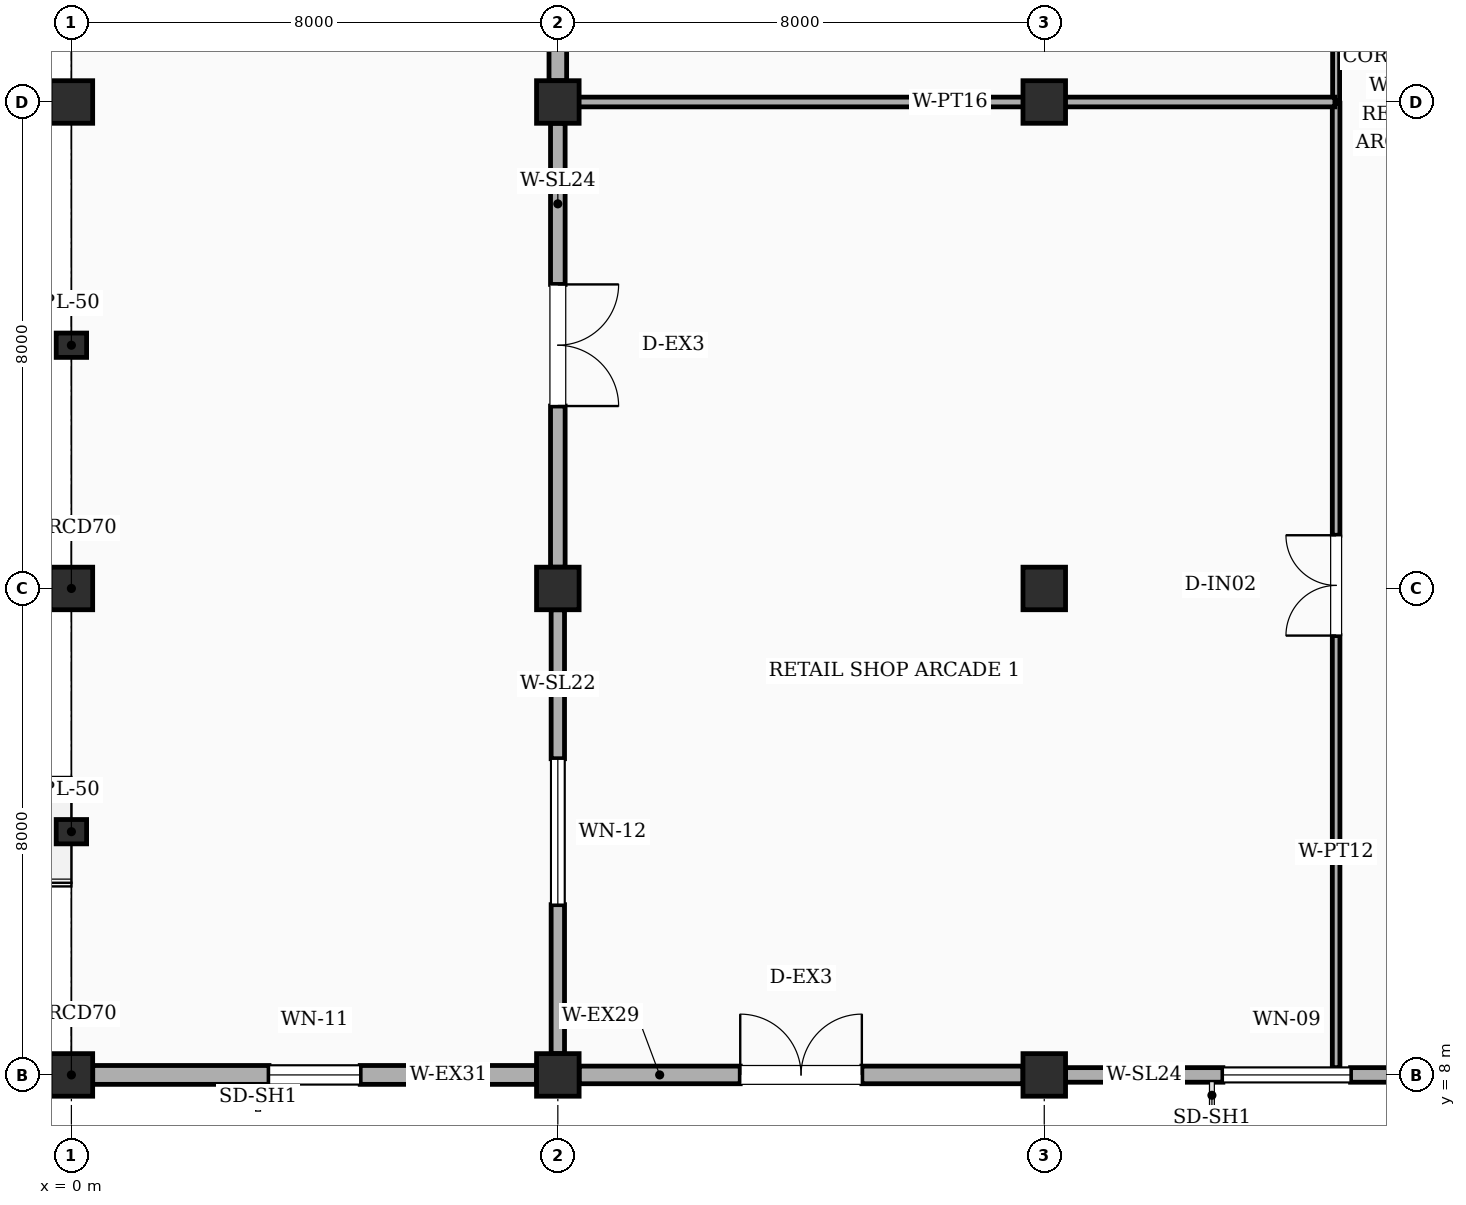
"""IFC4 building model, lengths in metres.
Left out: names, types, materials, properties, quantities, classifications, styles, units other than length and angle.
Written with IfcOpenShell. Run it as: python <this file> out.ifc"""

import sys

from ifc_helpers import new_model, si_unit, direction, frame, frame_2d, origin, origin_2d, place, context, subcontext, project, spatial, rectangle, circle, extrude, element, fill, save


model = new_model("IFC4")
c1 = context("Model", 3, precision=1e-05, world=origin(), true_north=direction((0.0, 1.0)))
c2 = subcontext(c1, "Body", "Model", "MODEL_VIEW")
j1 = project(units=[si_unit("LENGTHUNIT", "METRE"), si_unit("PLANEANGLEUNIT", "RADIAN")], contexts=[c1])
p1 = place(None, origin())
s1 = spatial("IfcSite", under=j1, at=p1, CompositionType="ELEMENT")
p2 = place(p1, origin())
s2 = spatial("IfcBuilding", under=s1, at=p2, CompositionType="ELEMENT")
p3 = place(p2, origin())
s3 = spatial("IfcBuildingStorey", under=s2, at=p3, CompositionType="ELEMENT", Elevation=0.0)
for number, where, z_axis, x_axis in (
    (1, (0.0, 8.0, 0.0), (0.0, 0.0, 1.0), (1.0, 0.0, 0.0)),
    (2, (0.0, 16.0, 0.0), (0.0, 0.0, 1.0), (1.0, 0.0, 0.0)),
    (3, (0.0, 24.0, 0.0), (0.0, 0.0, 1.0), (1.0, 0.0, 0.0)),
):
    element("IfcColumn", number, at=place(p3, frame(where, z_axis=z_axis, x_axis=x_axis)), inside=s3, PredefinedType="COLUMN", context=c2, shape_type="SweptSolid", body=[
        extrude(circle(Radius=0.35, at=origin_2d()), origin(), (0.0, 0.0, 1.0), 5.4),
    ])
for number, where, z_axis, x_axis in (
    (4, (8.0, 8.0, 0.0), (0.0, 0.0, 1.0), (1.0, 0.0, 0.0)),
    (5, (8.0, 16.0, 0.0), (0.0, 0.0, 1.0), (1.0, 0.0, 0.0)),
    (6, (8.0, 24.0, 0.0), (0.0, 0.0, 1.0), (1.0, 0.0, 0.0)),
    (7, (16.0, 8.0, 0.0), (0.0, 0.0, 1.0), (1.0, 0.0, 0.0)),
    (8, (16.0, 16.0, 0.0), (0.0, 0.0, 1.0), (1.0, 0.0, 0.0)),
    (9, (16.0, 24.0, 0.0), (0.0, 0.0, 1.0), (1.0, 0.0, 0.0)),
):
    element("IfcColumn", number, at=place(p3, frame(where, z_axis=z_axis, x_axis=x_axis)), inside=s3, PredefinedType="COLUMN", context=c2, shape_type="SweptSolid", body=[
        extrude(rectangle(XDim=0.7, YDim=0.7, at=origin_2d()), origin(), (0.0, 0.0, 1.0), 5.4),
    ])
for number, where, z_axis, x_axis in (
    (10, (0.0, 12.0, 0.0), (0.0, 0.0, 1.0), (1.0, 0.0, 0.0)),
    (11, (0.0, 20.0, 0.0), (0.0, 0.0, 1.0), (1.0, 0.0, 0.0)),
):
    element("IfcColumn", number, at=place(p3, frame(where, z_axis=z_axis, x_axis=x_axis)), inside=s3, PredefinedType="PILASTER", context=c2, shape_type="SweptSolid", body=[
        extrude(rectangle(XDim=0.5, YDim=0.4, at=origin_2d()), origin(), (0.0, 0.0, 1.0), 5.4),
    ])
p4 = place(p3, frame((0.35, 8.0, 0.0), z_axis=(0.0, 0.0, 1.0), x_axis=(1.0, 0.0, 0.0)))
e12 = element("IfcWall", 12, at=p4, inside=s3, PredefinedType="STANDARD", context=c2, shape_type="SweptSolid", body=[
    extrude(rectangle(XDim=7.3, YDim=0.31, at=frame_2d((3.65, 0.0))), origin(), (0.0, 0.0, 1.0), 5.1),
])
p5 = place(p4, frame((2.9, 0.0, 0.95)))
e13 = element("IfcOpeningElement", 13, at=p5, cuts=e12, PredefinedType="OPENING", context=c2, shape_type="SweptSolid", body=[
    extrude(rectangle(XDim=1.5, YDim=1.8, at=frame_2d((0.75, 0.9))), frame((0.0, 0.165, 0.0), z_axis=(0.0, -1.0, 0.0), x_axis=(1.0, 0.0, 0.0)), (0.0, 0.0, 1.0), 0.33),
])
p6 = place(p3, frame((8.35, 8.0, 0.0), z_axis=(0.0, 0.0, 1.0), x_axis=(1.0, 0.0, 0.0)))
e14 = element("IfcWall", 14, at=p6, inside=s3, PredefinedType="STANDARD", context=c2, shape_type="SweptSolid", body=[
    extrude(rectangle(XDim=7.3, YDim=0.29, at=frame_2d((3.65, 0.0))), origin(), (0.0, 0.0, 1.0), 4.42),
])
p7 = place(p6, frame((2.65, 0.0, 0.0)))
e15 = element("IfcOpeningElement", 15, at=p7, cuts=e14, PredefinedType="OPENING", context=c2, shape_type="SweptSolid", body=[
    extrude(rectangle(XDim=2.0, YDim=2.4, at=frame_2d((1.0, 1.2))), frame((0.0, 0.155, 0.0), z_axis=(0.0, -1.0, 0.0), x_axis=(1.0, 0.0, 0.0)), (0.0, 0.0, 1.0), 0.31),
])
p8 = place(p3, frame((16.35, 8.0, 0.0), z_axis=(0.0, 0.0, 1.0), x_axis=(1.0, 0.0, 0.0)))
e16 = element("IfcWall", 16, at=p8, inside=s3, PredefinedType="SOLIDWALL", context=c2, shape_type="SweptSolid", body=[
    extrude(rectangle(XDim=7.275, YDim=0.24, at=frame_2d((3.637, 0.0))), origin(), (0.0, 0.0, 1.0), 4.42),
])
p9 = place(p8, frame((2.587, 0.0, 0.95)))
e17 = element("IfcOpeningElement", 17, at=p9, cuts=e16, PredefinedType="OPENING", context=c2, shape_type="SweptSolid", body=[
    extrude(rectangle(XDim=2.1, YDim=2.0, at=frame_2d((1.05, 1.0))), frame((0.0, 0.13, 0.0), z_axis=(0.0, -1.0, 0.0), x_axis=(1.0, 0.0, 0.0)), (0.0, 0.0, 1.0), 0.26),
])
p10 = place(p3, frame((8.0, 31.65, 0.0), z_axis=(0.0, 0.0, 1.0), x_axis=(0.0, -1.0, 0.0)))
e18 = element("IfcWall", 18, at=p10, inside=s3, PredefinedType="STANDARD", context=c2, shape_type="SweptSolid", body=[
    extrude(rectangle(XDim=7.3, YDim=0.29, at=frame_2d((3.65, 0.0))), origin(), (0.0, 0.0, 1.0), 4.42),
])
p11 = place(p10, frame((2.75, 0.0, 0.95)))
e19 = element("IfcOpeningElement", 19, at=p11, cuts=e18, PredefinedType="OPENING", context=c2, shape_type="SweptSolid", body=[
    extrude(rectangle(XDim=1.8, YDim=1.85, at=frame_2d((0.9, 0.925))), frame((0.0, 0.155, 0.0), z_axis=(0.0, -1.0, 0.0), x_axis=(1.0, 0.0, 0.0)), (0.0, 0.0, 1.0), 0.31),
])
p12 = place(p3, frame((8.0, 23.65, 0.0), z_axis=(0.0, 0.0, 1.0), x_axis=(0.0, -1.0, 0.0)))
e20 = element("IfcWall", 20, at=p12, inside=s3, PredefinedType="SOLIDWALL", context=c2, shape_type="SweptSolid", body=[
    extrude(rectangle(XDim=7.3, YDim=0.24, at=frame_2d((3.65, 0.0))), origin(), (0.0, 0.0, 1.0), 4.42),
])
p13 = place(p12, frame((2.65, 0.0, 0.0)))
e21 = element("IfcOpeningElement", 21, at=p13, cuts=e20, PredefinedType="OPENING", context=c2, shape_type="SweptSolid", body=[
    extrude(rectangle(XDim=2.0, YDim=2.4, at=frame_2d((1.0, 1.2))), frame((0.0, 0.13, 0.0), z_axis=(0.0, -1.0, 0.0), x_axis=(1.0, 0.0, 0.0)), (0.0, 0.0, 1.0), 0.26),
])
p14 = place(p3, frame((8.0, 15.65, 0.0), z_axis=(0.0, 0.0, 1.0), x_axis=(0.0, -1.0, 0.0)))
e22 = element("IfcWall", 22, at=p14, inside=s3, PredefinedType="SOLIDWALL", context=c2, shape_type="SweptSolid", body=[
    extrude(rectangle(XDim=7.3, YDim=0.22, at=frame_2d((3.65, 0.0))), origin(), (0.0, 0.0, 1.0), 4.42),
])
p15 = place(p14, frame((2.45, 0.0, 0.95)))
e23 = element("IfcOpeningElement", 23, at=p15, cuts=e22, PredefinedType="OPENING", context=c2, shape_type="SweptSolid", body=[
    extrude(rectangle(XDim=2.4, YDim=1.85, at=frame_2d((1.2, 0.925))), frame((0.0, 0.12, 0.0), z_axis=(0.0, -1.0, 0.0), x_axis=(1.0, 0.0, 0.0)), (0.0, 0.0, 1.0), 0.24),
])
p16 = place(p3, frame((20.8, 8.12, 0.0), z_axis=(0.0, 0.0, 1.0), x_axis=(0.0, 1.0, 0.0)))
e24 = element("IfcWall", 24, at=p16, inside=s3, PredefinedType="PARTITIONING", context=c2, shape_type="SweptSolid", body=[
    extrude(rectangle(XDim=15.86, YDim=0.125, at=frame_2d((7.93, 0.0))), origin(), (0.0, 0.0, 1.0), 4.27),
])
p17 = place(p16, frame((7.105, 0.0, 0.0)))
e25 = element("IfcOpeningElement", 25, at=p17, cuts=e24, PredefinedType="OPENING", context=c2, shape_type="SweptSolid", body=[
    extrude(rectangle(XDim=1.65, YDim=2.25, at=frame_2d((0.825, 1.125))), frame((0.0, 0.073, 0.0), z_axis=(0.0, -1.0, 0.0), x_axis=(1.0, 0.0, 0.0)), (0.0, 0.0, 1.0), 0.145),
])
p18 = place(p3, frame((20.8, 24.02, 0.0), z_axis=(0.0, 0.0, 1.0), x_axis=(0.0, 1.0, 0.0)))
e26 = element("IfcWall", 26, at=p18, inside=s3, PredefinedType="PARTITIONING", context=c2, shape_type="SweptSolid", body=[
    extrude(rectangle(XDim=15.96, YDim=0.115, at=frame_2d((7.98, 0.0))), origin(), (0.0, 0.0, 1.0), 4.27),
])
p19 = place(p18, frame((7.255, 0.0, 0.0)))
e27 = element("IfcOpeningElement", 27, at=p19, cuts=e26, PredefinedType="OPENING", context=c2, shape_type="SweptSolid", body=[
    extrude(rectangle(XDim=1.45, YDim=2.2, at=frame_2d((0.725, 1.1))), frame((0.0, 0.067, 0.0), z_axis=(0.0, -1.0, 0.0), x_axis=(1.0, 0.0, 0.0)), (0.0, 0.0, 1.0), 0.135),
])
p20 = place(p3, frame((8.12, 24.0, 0.0), z_axis=(0.0, 0.0, 1.0), x_axis=(1.0, 0.0, 0.0)))
e28 = element("IfcWall", 28, at=p20, inside=s3, PredefinedType="PARTITIONING", context=c2, shape_type="SweptSolid", body=[
    extrude(rectangle(XDim=12.66, YDim=0.16, at=frame_2d((6.33, 0.0))), origin(), (0.0, 0.0, 1.0), 4.27),
])
p21 = place(p5, origin())
e29 = element("IfcWindow", 29, at=p21, inside=s3, PartitioningType="SINGLE_PANEL", PredefinedType="WINDOW", context=c2, shape_type="SweptSolid", body=[
    extrude(rectangle(XDim=1.5, YDim=1.8, at=frame_2d((0.75, 0.9))), frame((0.0, 0.03, 0.0), z_axis=(0.0, -1.0, 0.0), x_axis=(1.0, 0.0, 0.0)), (0.0, 0.0, 1.0), 0.06),
])
fill(e13, e29)
p22 = place(p7, frame((2.0, 0.0, 0.0), z_axis=(0.0, 0.0, 1.0), x_axis=(-1.0, 0.0, 0.0)))
e30 = element("IfcDoor", 30, at=p22, inside=s3, OperationType="DOUBLE_DOOR_SINGLE_SWING", PredefinedType="DOOR", context=c2, shape_type="SweptSolid", body=[
    extrude(rectangle(XDim=2.0, YDim=2.4, at=frame_2d((-1.0, 1.2))), frame((0.0, -0.025, 0.0), z_axis=(0.0, 1.0, 0.0), x_axis=(-1.0, 0.0, 0.0)), (0.0, 0.0, 1.0), 0.05),
])
fill(e15, e30)
p23 = place(p9, origin())
e31 = element("IfcWindow", 31, at=p23, inside=s3, PartitioningType="SINGLE_PANEL", PredefinedType="WINDOW", context=c2, shape_type="SweptSolid", body=[
    extrude(rectangle(XDim=2.1, YDim=2.0, at=frame_2d((1.05, 1.0))), frame((0.0, 0.03, 0.0), z_axis=(0.0, -1.0, 0.0), x_axis=(1.0, 0.0, 0.0)), (0.0, 0.0, 1.0), 0.06),
])
fill(e17, e31)
p24 = place(p13, frame((2.0, 0.0, 0.0), z_axis=(0.0, 0.0, 1.0), x_axis=(-1.0, 0.0, 0.0)))
e32 = element("IfcDoor", 32, at=p24, inside=s3, OperationType="DOUBLE_DOOR_SINGLE_SWING", PredefinedType="DOOR", context=c2, shape_type="SweptSolid", body=[
    extrude(rectangle(XDim=2.0, YDim=2.4, at=frame_2d((-1.0, 1.2))), frame((0.0, -0.025, 0.0), z_axis=(0.0, 1.0, 0.0), x_axis=(-1.0, 0.0, 0.0)), (0.0, 0.0, 1.0), 0.05),
])
fill(e21, e32)
p25 = place(p15, origin())
e33 = element("IfcWindow", 33, at=p25, inside=s3, PartitioningType="SINGLE_PANEL", PredefinedType="WINDOW", context=c2, shape_type="SweptSolid", body=[
    extrude(rectangle(XDim=2.4, YDim=1.85, at=frame_2d((1.2, 0.925))), frame((0.0, 0.03, 0.0), z_axis=(0.0, -1.0, 0.0), x_axis=(1.0, 0.0, 0.0)), (0.0, 0.0, 1.0), 0.06),
])
fill(e23, e33)
p26 = place(p17, origin())
e34 = element("IfcDoor", 34, at=p26, inside=s3, OperationType="DOUBLE_DOOR_SINGLE_SWING", PredefinedType="DOOR", context=c2, shape_type="SweptSolid", body=[
    extrude(rectangle(XDim=1.65, YDim=2.25, at=frame_2d((0.825, 1.125))), frame((0.0, 0.025, 0.0), z_axis=(0.0, -1.0, 0.0), x_axis=(1.0, 0.0, 0.0)), (0.0, 0.0, 1.0), 0.05),
])
fill(e25, e34)
save(model, sys.argv[1])
